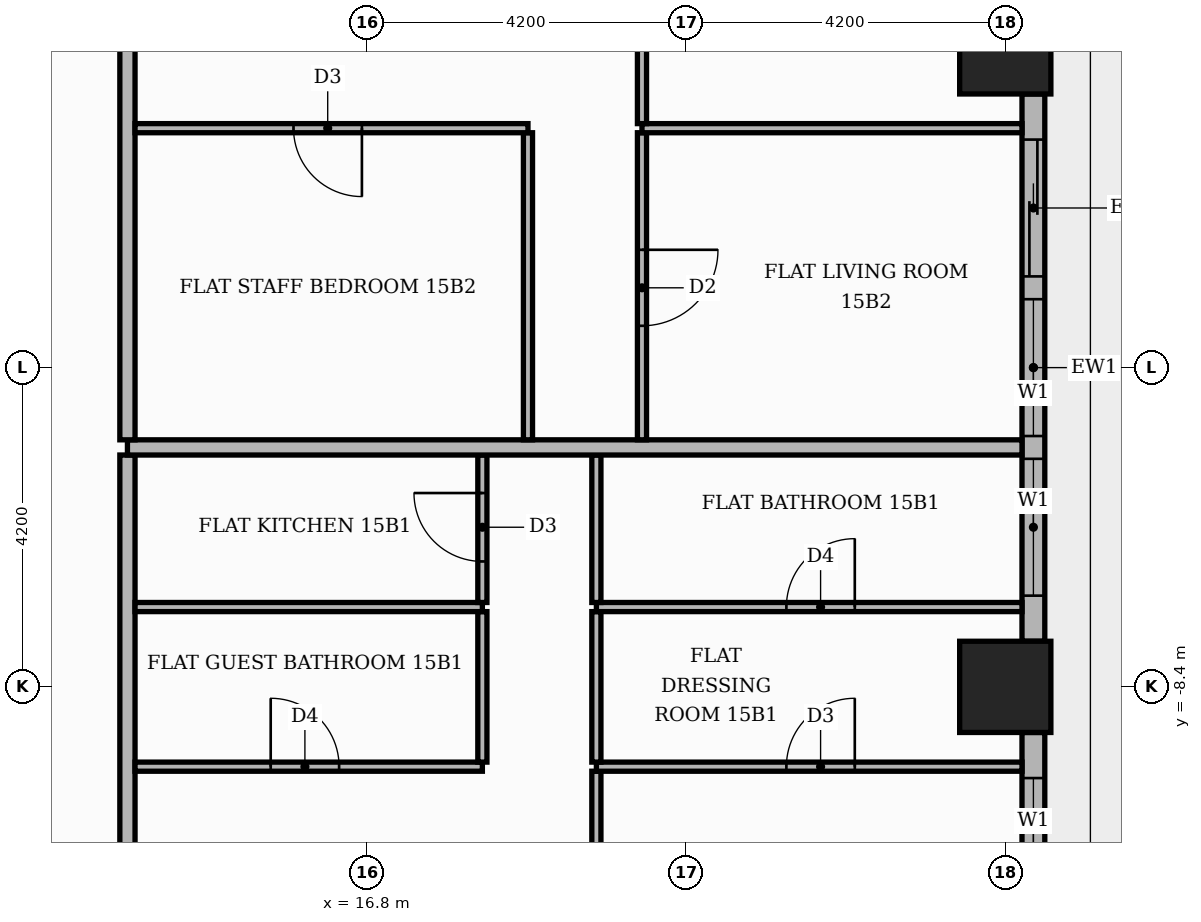
"""IFC4 building model, lengths in metres.
Left out: names, types, materials, properties, quantities, classifications, styles, units other than length and angle.
Written with IfcOpenShell. Run it as: python <this file> out.ifc"""

import sys

from ifc_helpers import new_model, si_unit, direction, frame, frame_2d, origin, origin_2d, place, context, subcontext, project, spatial, rectangle, extrude, element, fill, save


model = new_model("IFC4")
c1 = context("Model", 3, precision=1e-05, world=origin(), true_north=direction((0.0, 1.0)))
c2 = subcontext(c1, "Body", "Model", "MODEL_VIEW")
j1 = project(units=[si_unit("LENGTHUNIT", "METRE"), si_unit("PLANEANGLEUNIT", "RADIAN")], contexts=[c1])
p1 = place(None, origin())
s1 = spatial("IfcSite", under=j1, at=p1, CompositionType="ELEMENT")
p2 = place(p1, origin())
s2 = spatial("IfcBuilding", under=s1, at=p2, CompositionType="ELEMENT")
p3 = place(p2, frame((0.0, 0.0, 66.0)))
s3 = spatial("IfcBuildingStorey", under=s2, at=p3, CompositionType="ELEMENT", Elevation=66.0)
for number, where, z_axis, x_axis in (
    (1, (25.2, 0.0, 0.0), (0.0, 0.0, 1.0), (1.0, 0.0, 0.0)),
    (2, (25.2, -8.4, 0.0), (0.0, 0.0, 1.0), (1.0, 0.0, 0.0)),
):
    element("IfcColumn", number, at=place(p3, frame(where, z_axis=z_axis, x_axis=x_axis)), inside=s3, PredefinedType="COLUMN", context=c2, shape_type="SweptSolid", body=[
        extrude(rectangle(XDim=1.2, YDim=1.2, at=origin_2d()), origin(), (0.0, 0.0, 1.0), 3.9),
    ])
p4 = place(p3, frame((25.57, -16.2, 0.0), z_axis=(0.0, 0.0, 1.0), x_axis=(0.0, 1.0, 0.0)))
e3 = element("IfcWall", 3, at=p4, inside=s3, PredefinedType="STANDARD", context=c2, shape_type="SweptSolid", body=[
    extrude(rectangle(XDim=7.2, YDim=0.3, at=frame_2d((3.6, 0.0))), origin(), (0.0, 0.0, 1.0), 3.48),
])
p5 = place(p4, frame((0.6, 0.0, 0.0)))
e4 = element("IfcOpeningElement", 4, at=p5, cuts=e3, PredefinedType="OPENING", context=c2, shape_type="SweptSolid", body=[
    extrude(rectangle(XDim=1.8, YDim=2.4, at=frame_2d((0.9, 1.2))), frame((0.0, 0.16, 0.0), z_axis=(0.0, -1.0, 0.0), x_axis=(1.0, 0.0, 0.0)), (0.0, 0.0, 1.0), 0.32),
])
p6 = place(p4, frame((2.7, 0.0, 0.0)))
e5 = element("IfcOpeningElement", 5, at=p6, cuts=e3, PredefinedType="OPENING", context=c2, shape_type="SweptSolid", body=[
    extrude(rectangle(XDim=1.8, YDim=2.4, at=frame_2d((0.9, 1.2))), frame((0.0, 0.16, 0.0), z_axis=(0.0, -1.0, 0.0), x_axis=(1.0, 0.0, 0.0)), (0.0, 0.0, 1.0), 0.32),
])
p7 = place(p4, frame((4.8, 0.0, 0.9)))
e6 = element("IfcOpeningElement", 6, at=p7, cuts=e3, PredefinedType="OPENING", context=c2, shape_type="SweptSolid", body=[
    extrude(rectangle(XDim=1.8, YDim=2.1, at=frame_2d((0.9, 1.05))), frame((0.0, 0.16, 0.0), z_axis=(0.0, -1.0, 0.0), x_axis=(1.0, 0.0, 0.0)), (0.0, 0.0, 1.0), 0.32),
])
p8 = place(p3, frame((25.57, -7.8, 0.0), z_axis=(0.0, 0.0, 1.0), x_axis=(0.0, 1.0, 0.0)))
e7 = element("IfcWall", 7, at=p8, inside=s3, PredefinedType="STANDARD", context=c2, shape_type="SweptSolid", body=[
    extrude(rectangle(XDim=7.2, YDim=0.3, at=frame_2d((3.6, 0.0))), origin(), (0.0, 0.0, 1.0), 3.48),
])
p9 = place(p8, frame((0.6, 0.0, 0.9)))
e8 = element("IfcOpeningElement", 8, at=p9, cuts=e7, PredefinedType="OPENING", context=c2, shape_type="SweptSolid", body=[
    extrude(rectangle(XDim=1.8, YDim=2.1, at=frame_2d((0.9, 1.05))), frame((0.0, 0.16, 0.0), z_axis=(0.0, -1.0, 0.0), x_axis=(1.0, 0.0, 0.0)), (0.0, 0.0, 1.0), 0.32),
])
p10 = place(p8, frame((2.7, 0.0, 0.9)))
e9 = element("IfcOpeningElement", 9, at=p10, cuts=e7, PredefinedType="OPENING", context=c2, shape_type="SweptSolid", body=[
    extrude(rectangle(XDim=1.8, YDim=2.1, at=frame_2d((0.9, 1.05))), frame((0.0, 0.16, 0.0), z_axis=(0.0, -1.0, 0.0), x_axis=(1.0, 0.0, 0.0)), (0.0, 0.0, 1.0), 0.32),
])
p11 = place(p8, frame((4.8, 0.0, 0.0)))
e10 = element("IfcOpeningElement", 10, at=p11, cuts=e7, PredefinedType="OPENING", context=c2, shape_type="SweptSolid", body=[
    extrude(rectangle(XDim=1.8, YDim=2.4, at=frame_2d((0.9, 1.2))), frame((0.0, 0.16, 0.0), z_axis=(0.0, -1.0, 0.0), x_axis=(1.0, 0.0, 0.0)), (0.0, 0.0, 1.0), 0.32),
])
p12 = place(p3, frame((19.82, -13.59, 0.0), z_axis=(0.0, 0.0, 1.0), x_axis=(0.0, 1.0, 0.0)))
e11 = element("IfcWall", 11, at=p12, inside=s3, PredefinedType="PARTITIONING", context=c2, shape_type="SweptSolid", body=[
    extrude(rectangle(XDim=4.08, YDim=0.12, at=frame_2d((2.04, 0.0))), origin(), (0.0, 0.0, 1.0), 3.48),
])
p13 = place(p12, frame((1.59, 0.0, 0.0)))
e12 = element("IfcOpeningElement", 12, at=p13, cuts=e11, PredefinedType="OPENING", context=c2, shape_type="SweptSolid", body=[
    extrude(rectangle(XDim=0.9, YDim=2.1, at=frame_2d((0.45, 1.05))), frame((0.0, 0.07, 0.0), z_axis=(0.0, -1.0, 0.0), x_axis=(1.0, 0.0, 0.0)), (0.0, 0.0, 1.0), 0.14),
])
p14 = place(p3, frame((13.65, -13.55, 0.0), z_axis=(0.0, 0.0, 1.0), x_axis=(0.0, 1.0, 0.0)))
e13 = element("IfcWall", 13, at=p14, inside=s3, PredefinedType="PARTITIONING", context=c2, shape_type="SweptSolid", body=[
    extrude(rectangle(XDim=8.2, YDim=0.2, at=frame_2d((4.1, 0.0))), origin(), (0.0, 0.0, 1.0), 3.48),
])
p15 = place(p14, frame((1.45, 0.0, 0.0)))
e14 = element("IfcOpeningElement", 14, at=p15, cuts=e13, PredefinedType="OPENING", context=c2, shape_type="SweptSolid", body=[
    extrude(rectangle(XDim=1.1, YDim=2.4, at=frame_2d((0.55, 1.2))), frame((0.0, 0.11, 0.0), z_axis=(0.0, -1.0, 0.0), x_axis=(1.0, 0.0, 0.0)), (0.0, 0.0, 1.0), 0.22),
])
p16 = place(p3, frame((13.75, -9.45, 0.0), z_axis=(0.0, 0.0, 1.0), x_axis=(1.0, 0.0, 0.0)))
e15 = element("IfcWall", 15, at=p16, inside=s3, PredefinedType="PARTITIONING", context=c2, shape_type="SweptSolid", body=[
    extrude(rectangle(XDim=4.57, YDim=0.12, at=frame_2d((2.285, 0.0))), origin(), (0.0, 0.0, 1.0), 3.48),
])
p17 = place(p16, frame((1.785, 0.0, 0.0)))
e16 = element("IfcOpeningElement", 16, at=p17, cuts=e15, PredefinedType="OPENING", context=c2, shape_type="SweptSolid", body=[
    extrude(rectangle(XDim=0.9, YDim=2.1, at=frame_2d((0.45, 1.05))), frame((0.0, 0.07, 0.0), z_axis=(0.0, -1.0, 0.0), x_axis=(1.0, 0.0, 0.0)), (0.0, 0.0, 1.0), 0.14),
])
p18 = place(p3, frame((19.82, -9.45, 0.0), z_axis=(0.0, 0.0, 1.0), x_axis=(1.0, 0.0, 0.0)))
e17 = element("IfcWall", 17, at=p18, inside=s3, PredefinedType="PARTITIONING", context=c2, shape_type="SweptSolid", body=[
    extrude(rectangle(XDim=5.6, YDim=0.12, at=frame_2d((2.8, 0.0))), origin(), (0.0, 0.0, 1.0), 3.48),
])
p19 = place(p18, frame((2.5, 0.0, 0.0)))
e18 = element("IfcOpeningElement", 18, at=p19, cuts=e17, PredefinedType="OPENING", context=c2, shape_type="SweptSolid", body=[
    extrude(rectangle(XDim=0.9, YDim=2.1, at=frame_2d((0.45, 1.05))), frame((0.0, 0.07, 0.0), z_axis=(0.0, -1.0, 0.0), x_axis=(1.0, 0.0, 0.0)), (0.0, 0.0, 1.0), 0.14),
])
for number, where, z_axis, x_axis in (
    (19, (18.32, -9.39, 0.0), (0.0, 0.0, 1.0), (0.0, 1.0, 0.0)),
    (20, (19.82, -9.39, 0.0), (0.0, 0.0, 1.0), (0.0, 1.0, 0.0)),
):
    element("IfcWall", number, at=place(p3, frame(where, z_axis=z_axis, x_axis=x_axis)), inside=s3, PredefinedType="PARTITIONING", context=c2, shape_type="SweptSolid", body=[
        extrude(rectangle(XDim=1.98, YDim=0.12, at=frame_2d((0.99, 0.0))), origin(), (0.0, 0.0, 1.0), 3.48),
    ])
p20 = place(p3, frame((13.75, -7.35, 0.0), z_axis=(0.0, 0.0, 1.0), x_axis=(1.0, 0.0, 0.0)))
e21 = element("IfcWall", 21, at=p20, inside=s3, PredefinedType="PARTITIONING", context=c2, shape_type="SweptSolid", body=[
    extrude(rectangle(XDim=4.57, YDim=0.12, at=frame_2d((2.285, 0.0))), origin(), (0.0, 0.0, 1.0), 3.48),
])
p21 = place(p3, frame((19.82, -7.35, 0.0), z_axis=(0.0, 0.0, 1.0), x_axis=(1.0, 0.0, 0.0)))
e22 = element("IfcWall", 22, at=p21, inside=s3, PredefinedType="PARTITIONING", context=c2, shape_type="SweptSolid", body=[
    extrude(rectangle(XDim=5.6, YDim=0.12, at=frame_2d((2.8, 0.0))), origin(), (0.0, 0.0, 1.0), 3.48),
])
p22 = place(p21, frame((2.5, 0.0, 0.0)))
e23 = element("IfcOpeningElement", 23, at=p22, cuts=e22, PredefinedType="OPENING", context=c2, shape_type="SweptSolid", body=[
    extrude(rectangle(XDim=0.9, YDim=2.1, at=frame_2d((0.45, 1.05))), frame((0.0, 0.07, 0.0), z_axis=(0.0, -1.0, 0.0), x_axis=(1.0, 0.0, 0.0)), (0.0, 0.0, 1.0), 0.14),
])
p23 = place(p3, frame((18.32, -7.29, 0.0), z_axis=(0.0, 0.0, 1.0), x_axis=(0.0, 1.0, 0.0)))
e24 = element("IfcWall", 24, at=p23, inside=s3, PredefinedType="PARTITIONING", context=c2, shape_type="SweptSolid", body=[
    extrude(rectangle(XDim=1.94, YDim=0.12, at=frame_2d((0.97, 0.0))), origin(), (0.0, 0.0, 1.0), 3.48),
])
p24 = place(p23, frame((0.54, 0.0, 0.0)))
e25 = element("IfcOpeningElement", 25, at=p24, cuts=e24, PredefinedType="OPENING", context=c2, shape_type="SweptSolid", body=[
    extrude(rectangle(XDim=0.9, YDim=2.1, at=frame_2d((0.45, 1.05))), frame((0.0, 0.07, 0.0), z_axis=(0.0, -1.0, 0.0), x_axis=(1.0, 0.0, 0.0)), (0.0, 0.0, 1.0), 0.14),
])
p25 = place(p3, frame((19.82, -7.29, 0.0), z_axis=(0.0, 0.0, 1.0), x_axis=(0.0, 1.0, 0.0)))
e26 = element("IfcWall", 26, at=p25, inside=s3, PredefinedType="PARTITIONING", context=c2, shape_type="SweptSolid", body=[
    extrude(rectangle(XDim=1.94, YDim=0.12, at=frame_2d((0.97, 0.0))), origin(), (0.0, 0.0, 1.0), 3.48),
])
p26 = place(p3, frame((13.65, -5.25, 0.0), z_axis=(0.0, 0.0, 1.0), x_axis=(1.0, 0.0, 0.0)))
e27 = element("IfcWall", 27, at=p26, inside=s3, PredefinedType="PARTITIONING", context=c2, shape_type="SweptSolid", body=[
    extrude(rectangle(XDim=11.77, YDim=0.2, at=frame_2d((5.885, 0.0))), origin(), (0.0, 0.0, 1.0), 3.48),
])
p27 = place(p3, frame((13.65, -5.15, 0.0), z_axis=(0.0, 0.0, 1.0), x_axis=(0.0, 1.0, 0.0)))
e28 = element("IfcWall", 28, at=p27, inside=s3, PredefinedType="PARTITIONING", context=c2, shape_type="SweptSolid", body=[
    extrude(rectangle(XDim=18.7, YDim=0.2, at=frame_2d((9.35, 0.0))), origin(), (0.0, 0.0, 1.0), 3.48),
])
p28 = place(p27, frame((5.65, 0.0, 0.0)))
e29 = element("IfcOpeningElement", 29, at=p28, cuts=e28, PredefinedType="OPENING", context=c2, shape_type="SweptSolid", body=[
    extrude(rectangle(XDim=1.1, YDim=2.4, at=frame_2d((0.55, 1.2))), frame((0.0, 0.11, 0.0), z_axis=(0.0, -1.0, 0.0), x_axis=(1.0, 0.0, 0.0)), (0.0, 0.0, 1.0), 0.22),
])
p29 = place(p3, frame((18.92, -5.15, 0.0), z_axis=(0.0, 0.0, 1.0), x_axis=(0.0, 1.0, 0.0)))
e30 = element("IfcWall", 30, at=p29, inside=s3, PredefinedType="PARTITIONING", context=c2, shape_type="SweptSolid", body=[
    extrude(rectangle(XDim=4.04, YDim=0.12, at=frame_2d((2.02, 0.0))), origin(), (0.0, 0.0, 1.0), 3.48),
])
p30 = place(p3, frame((20.42, -5.15, 0.0), z_axis=(0.0, 0.0, 1.0), x_axis=(0.0, 1.0, 0.0)))
e31 = element("IfcWall", 31, at=p30, inside=s3, PredefinedType="PARTITIONING", context=c2, shape_type="SweptSolid", body=[
    extrude(rectangle(XDim=4.04, YDim=0.12, at=frame_2d((2.02, 0.0))), origin(), (0.0, 0.0, 1.0), 3.48),
])
p31 = place(p30, frame((1.5, 0.0, 0.0)))
e32 = element("IfcOpeningElement", 32, at=p31, cuts=e31, PredefinedType="OPENING", context=c2, shape_type="SweptSolid", body=[
    extrude(rectangle(XDim=1.0, YDim=2.1, at=frame_2d((0.5, 1.05))), frame((0.0, 0.07, 0.0), z_axis=(0.0, -1.0, 0.0), x_axis=(1.0, 0.0, 0.0)), (0.0, 0.0, 1.0), 0.14),
])
p32 = place(p3, frame((13.75, -1.05, 0.0), z_axis=(0.0, 0.0, 1.0), x_axis=(1.0, 0.0, 0.0)))
e33 = element("IfcWall", 33, at=p32, inside=s3, PredefinedType="PARTITIONING", context=c2, shape_type="SweptSolid", body=[
    extrude(rectangle(XDim=5.17, YDim=0.12, at=frame_2d((2.585, 0.0))), origin(), (0.0, 0.0, 1.0), 3.48),
])
p33 = place(p32, frame((2.085, 0.0, 0.0)))
e34 = element("IfcOpeningElement", 34, at=p33, cuts=e33, PredefinedType="OPENING", context=c2, shape_type="SweptSolid", body=[
    extrude(rectangle(XDim=0.9, YDim=2.1, at=frame_2d((0.45, 1.05))), frame((0.0, 0.07, 0.0), z_axis=(0.0, -1.0, 0.0), x_axis=(1.0, 0.0, 0.0)), (0.0, 0.0, 1.0), 0.14),
])
p34 = place(p3, frame((20.42, -1.05, 0.0), z_axis=(0.0, 0.0, 1.0), x_axis=(1.0, 0.0, 0.0)))
e35 = element("IfcWall", 35, at=p34, inside=s3, PredefinedType="PARTITIONING", context=c2, shape_type="SweptSolid", body=[
    extrude(rectangle(XDim=5.0, YDim=0.12, at=frame_2d((2.5, 0.0))), origin(), (0.0, 0.0, 1.0), 3.48),
])
p35 = place(p3, frame((20.42, -0.99, 0.0), z_axis=(0.0, 0.0, 1.0), x_axis=(0.0, 1.0, 0.0)))
e36 = element("IfcWall", 36, at=p35, inside=s3, PredefinedType="PARTITIONING", context=c2, shape_type="SweptSolid", body=[
    extrude(rectangle(XDim=4.08, YDim=0.12, at=frame_2d((2.04, 0.0))), origin(), (0.0, 0.0, 1.0), 3.48),
])
p36 = place(p35, frame((1.59, 0.0, 0.0)))
e37 = element("IfcOpeningElement", 37, at=p36, cuts=e36, PredefinedType="OPENING", context=c2, shape_type="SweptSolid", body=[
    extrude(rectangle(XDim=0.9, YDim=2.1, at=frame_2d((0.45, 1.05))), frame((0.0, 0.07, 0.0), z_axis=(0.0, -1.0, 0.0), x_axis=(1.0, 0.0, 0.0)), (0.0, 0.0, 1.0), 0.14),
])
p37 = place(p7, origin())
e38 = element("IfcWindow", 38, at=p37, inside=s3, PartitioningType="SINGLE_PANEL", PredefinedType="WINDOW", context=c2, shape_type="SweptSolid", body=[
    extrude(rectangle(XDim=1.8, YDim=2.1, at=frame_2d((0.9, 1.05))), frame((0.0, 0.03, 0.0), z_axis=(0.0, -1.0, 0.0), x_axis=(1.0, 0.0, 0.0)), (0.0, 0.0, 1.0), 0.06),
])
fill(e6, e38)
p38 = place(p9, origin())
e39 = element("IfcWindow", 39, at=p38, inside=s3, PartitioningType="SINGLE_PANEL", PredefinedType="WINDOW", context=c2, shape_type="SweptSolid", body=[
    extrude(rectangle(XDim=1.8, YDim=2.1, at=frame_2d((0.9, 1.05))), frame((0.0, 0.03, 0.0), z_axis=(0.0, -1.0, 0.0), x_axis=(1.0, 0.0, 0.0)), (0.0, 0.0, 1.0), 0.06),
])
fill(e8, e39)
p39 = place(p10, origin())
e40 = element("IfcWindow", 40, at=p39, inside=s3, PartitioningType="SINGLE_PANEL", PredefinedType="WINDOW", context=c2, shape_type="SweptSolid", body=[
    extrude(rectangle(XDim=1.8, YDim=2.1, at=frame_2d((0.9, 1.05))), frame((0.0, 0.03, 0.0), z_axis=(0.0, -1.0, 0.0), x_axis=(1.0, 0.0, 0.0)), (0.0, 0.0, 1.0), 0.06),
])
fill(e9, e40)
p40 = place(p11, origin())
e41 = element("IfcDoor", 41, at=p40, inside=s3, OperationType="SLIDING_TO_RIGHT", PredefinedType="DOOR", context=c2, shape_type="SweptSolid", body=[
    extrude(rectangle(XDim=1.8, YDim=2.4, at=frame_2d((0.9, 1.2))), frame((0.0, 0.025, 0.0), z_axis=(0.0, -1.0, 0.0), x_axis=(1.0, 0.0, 0.0)), (0.0, 0.0, 1.0), 0.05),
])
fill(e10, e41)
p41 = place(p17, origin())
e42 = element("IfcDoor", 42, at=p41, inside=s3, OperationType="SINGLE_SWING_LEFT", PredefinedType="DOOR", context=c2, shape_type="SweptSolid", body=[
    extrude(rectangle(XDim=0.9, YDim=2.1, at=frame_2d((0.45, 1.05))), frame((0.0, 0.025, 0.0), z_axis=(0.0, -1.0, 0.0), x_axis=(1.0, 0.0, 0.0)), (0.0, 0.0, 1.0), 0.05),
])
fill(e16, e42)
p42 = place(p24, origin())
e43 = element("IfcDoor", 43, at=p42, inside=s3, OperationType="SINGLE_SWING_RIGHT", PredefinedType="DOOR", context=c2, shape_type="SweptSolid", body=[
    extrude(rectangle(XDim=0.9, YDim=2.1, at=frame_2d((0.45, 1.05))), frame((0.0, 0.025, 0.0), z_axis=(0.0, -1.0, 0.0), x_axis=(1.0, 0.0, 0.0)), (0.0, 0.0, 1.0), 0.05),
])
fill(e25, e43)
p43 = place(p19, origin())
e44 = element("IfcDoor", 44, at=p43, inside=s3, OperationType="SINGLE_SWING_RIGHT", PredefinedType="DOOR", context=c2, shape_type="SweptSolid", body=[
    extrude(rectangle(XDim=0.9, YDim=2.1, at=frame_2d((0.45, 1.05))), frame((0.0, 0.025, 0.0), z_axis=(0.0, -1.0, 0.0), x_axis=(1.0, 0.0, 0.0)), (0.0, 0.0, 1.0), 0.05),
])
fill(e18, e44)
p44 = place(p22, origin())
e45 = element("IfcDoor", 45, at=p44, inside=s3, OperationType="SINGLE_SWING_RIGHT", PredefinedType="DOOR", context=c2, shape_type="SweptSolid", body=[
    extrude(rectangle(XDim=0.9, YDim=2.1, at=frame_2d((0.45, 1.05))), frame((0.0, 0.025, 0.0), z_axis=(0.0, -1.0, 0.0), x_axis=(1.0, 0.0, 0.0)), (0.0, 0.0, 1.0), 0.05),
])
fill(e23, e45)
p45 = place(p33, frame((0.9, 0.0, 0.0), z_axis=(0.0, 0.0, 1.0), x_axis=(-1.0, 0.0, 0.0)))
e46 = element("IfcDoor", 46, at=p45, inside=s3, OperationType="SINGLE_SWING_RIGHT", PredefinedType="DOOR", context=c2, shape_type="SweptSolid", body=[
    extrude(rectangle(XDim=0.9, YDim=2.1, at=frame_2d((0.45, 1.05))), frame((0.0, 0.025, 0.0), z_axis=(0.0, -1.0, 0.0), x_axis=(1.0, 0.0, 0.0)), (0.0, 0.0, 1.0), 0.05),
])
fill(e34, e46)
p46 = place(p31, frame((1.0, 0.0, 0.0), z_axis=(0.0, 0.0, 1.0), x_axis=(-1.0, 0.0, 0.0)))
e47 = element("IfcDoor", 47, at=p46, inside=s3, OperationType="SINGLE_SWING_RIGHT", PredefinedType="DOOR", context=c2, shape_type="SweptSolid", body=[
    extrude(rectangle(XDim=1.0, YDim=2.1, at=frame_2d((0.5, 1.05))), frame((0.0, 0.025, 0.0), z_axis=(0.0, -1.0, 0.0), x_axis=(1.0, 0.0, 0.0)), (0.0, 0.0, 1.0), 0.05),
])
fill(e32, e47)
save(model, sys.argv[1])
